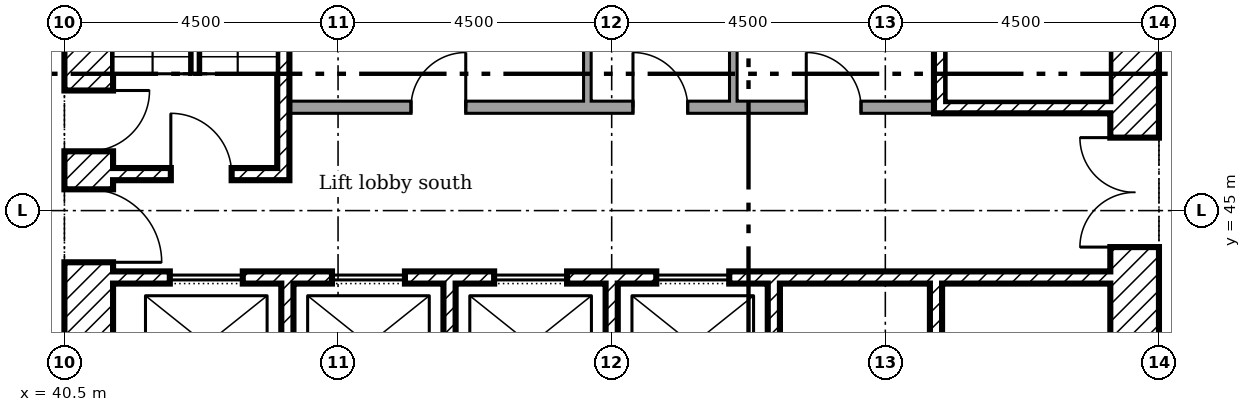
"""IFC4 building model, lengths in metres.
Left out: names, types, materials, properties, quantities, classifications, styles, units other than length and angle.
Written with IfcOpenShell. Run it as: python <this file> out.ifc"""

import sys

from ifc_helpers import new_model, si_unit, direction, frame, frame_2d, origin, place, context, subcontext, project, spatial, rectangle, extrude, element, fill, save


model = new_model("IFC4")
c1 = context("Model", 3, precision=1e-05, world=origin(), true_north=direction((0.0, 1.0)))
c2 = subcontext(c1, "Body", "Model", "MODEL_VIEW")
j1 = project(units=[si_unit("LENGTHUNIT", "METRE"), si_unit("PLANEANGLEUNIT", "RADIAN")], contexts=[c1])
p1 = place(None, origin())
s1 = spatial("IfcSite", under=j1, at=p1, CompositionType="ELEMENT")
p2 = place(p1, origin())
s2 = spatial("IfcBuilding", under=s1, at=p2, CompositionType="ELEMENT")
p3 = place(p2, frame((0.0, 0.0, 65.4)))
s3 = spatial("IfcBuildingStorey", under=s2, at=p3, CompositionType="ELEMENT", Elevation=65.4)
p4 = place(p3, frame((58.1, 40.5, 0.0), z_axis=(0.0, 0.0, 1.0), x_axis=(0.0, 1.0, 0.0)))
e1 = element("IfcWall", 1, at=p4, inside=s3, PredefinedType="SHEAR", context=c2, shape_type="SweptSolid", body=[
    extrude(rectangle(XDim=18.0, YDim=0.8, at=frame_2d((9.0, 0.0))), origin(), (0.0, 0.0, 1.0), 3.35),
])
p5 = place(p4, frame((13.15, 0.0, 0.0)))
e2 = element("IfcOpeningElement", 2, at=p5, cuts=e1, PredefinedType="OPENING", context=c2, shape_type="SweptSolid", body=[
    extrude(rectangle(XDim=1.2, YDim=2.1, at=frame_2d((0.6, 1.05))), frame((0.0, 0.41, 0.0), z_axis=(0.0, -1.0, 0.0), x_axis=(1.0, 0.0, 0.0)), (0.0, 0.0, 1.0), 0.82),
])
p6 = place(p4, frame((3.9, 0.0, 0.0)))
e3 = element("IfcOpeningElement", 3, at=p6, cuts=e1, PredefinedType="OPENING", context=c2, shape_type="SweptSolid", body=[
    extrude(rectangle(XDim=1.8, YDim=2.1, at=frame_2d((0.9, 1.05))), frame((0.0, 0.41, 0.0), z_axis=(0.0, -1.0, 0.0), x_axis=(1.0, 0.0, 0.0)), (0.0, 0.0, 1.0), 0.82),
])
p7 = place(p4, frame((11.525, 0.0, 0.0)))
e4 = element("IfcOpeningElement", 4, at=p7, cuts=e1, PredefinedType="OPENING", context=c2, shape_type="SweptSolid", body=[
    extrude(rectangle(XDim=1.0, YDim=2.1, at=frame_2d((0.5, 1.05))), frame((0.0, 0.41, 0.0), z_axis=(0.0, -1.0, 0.0), x_axis=(1.0, 0.0, 0.0)), (0.0, 0.0, 1.0), 0.82),
])
p8 = place(p3, frame((40.9, 40.5, 0.0), z_axis=(0.0, 0.0, 1.0), x_axis=(0.0, 1.0, 0.0)))
e5 = element("IfcWall", 5, at=p8, inside=s3, PredefinedType="SHEAR", context=c2, shape_type="SweptSolid", body=[
    extrude(rectangle(XDim=18.0, YDim=0.8, at=frame_2d((9.0, 0.0))), origin(), (0.0, 0.0, 1.0), 3.35),
])
p9 = place(p8, frame((3.65, 0.0, 0.0)))
e6 = element("IfcOpeningElement", 6, at=p9, cuts=e5, PredefinedType="OPENING", context=c2, shape_type="SweptSolid", body=[
    extrude(rectangle(XDim=1.2, YDim=2.1, at=frame_2d((0.6, 1.05))), frame((0.0, 0.41, 0.0), z_axis=(0.0, -1.0, 0.0), x_axis=(1.0, 0.0, 0.0)), (0.0, 0.0, 1.0), 0.82),
])
p10 = place(p8, frame((5.475, 0.0, 0.0)))
e7 = element("IfcOpeningElement", 7, at=p10, cuts=e5, PredefinedType="OPENING", context=c2, shape_type="SweptSolid", body=[
    extrude(rectangle(XDim=1.0, YDim=2.1, at=frame_2d((0.5, 1.05))), frame((0.0, 0.41, 0.0), z_axis=(0.0, -1.0, 0.0), x_axis=(1.0, 0.0, 0.0)), (0.0, 0.0, 1.0), 0.82),
])
p11 = place(p8, frame((12.3, 0.0, 0.0)))
e8 = element("IfcOpeningElement", 8, at=p11, cuts=e5, PredefinedType="OPENING", context=c2, shape_type="SweptSolid", body=[
    extrude(rectangle(XDim=1.0, YDim=2.1, at=frame_2d((0.5, 1.05))), frame((0.0, 0.41, 0.0), z_axis=(0.0, -1.0, 0.0), x_axis=(1.0, 0.0, 0.0)), (0.0, 0.0, 1.0), 0.82),
])
for number, where, z_axis, x_axis in (
    (9, (44.167, 41.3, 0.0), (0.0, 0.0, 1.0), (0.0, 1.0, 0.0)),
    (10, (46.833, 41.3, 0.0), (0.0, 0.0, 1.0), (0.0, 1.0, 0.0)),
    (11, (49.5, 41.3, 0.0), (0.0, 0.0, 1.0), (0.0, 1.0, 0.0)),
    (12, (52.167, 41.3, 0.0), (0.0, 0.0, 1.0), (0.0, 1.0, 0.0)),
    (13, (54.833, 41.3, 0.0), (0.0, 0.0, 1.0), (0.0, 1.0, 0.0)),
):
    element("IfcWall", number, at=place(p3, frame(where, z_axis=z_axis, x_axis=x_axis)), inside=s3, PredefinedType="SHEAR", context=c2, shape_type="SweptSolid", body=[
        extrude(rectangle(XDim=2.5, YDim=0.2, at=frame_2d((1.25, 0.0))), origin(), (0.0, 0.0, 1.0), 3.35),
    ])
p12 = place(p3, frame((41.3, 43.9, 0.0)))
e14 = element("IfcWall", 14, at=p12, inside=s3, PredefinedType="SHEAR", context=c2, shape_type="SweptSolid", body=[
    extrude(rectangle(XDim=16.4, YDim=0.2, at=frame_2d((8.2, 0.0))), origin(), (0.0, 0.0, 1.0), 3.35),
])
p13 = place(p12, frame((0.933, 0.0, 0.0)))
e15 = element("IfcOpeningElement", 15, at=p13, cuts=e14, PredefinedType="OPENING", context=c2, shape_type="SweptSolid", body=[
    extrude(rectangle(XDim=1.2, YDim=2.1, at=frame_2d((0.6, 1.05))), frame((0.0, 0.11, 0.0), z_axis=(0.0, -1.0, 0.0), x_axis=(1.0, 0.0, 0.0)), (0.0, 0.0, 1.0), 0.22),
])
p14 = place(p12, frame((3.6, 0.0, 0.0)))
e16 = element("IfcOpeningElement", 16, at=p14, cuts=e14, PredefinedType="OPENING", context=c2, shape_type="SweptSolid", body=[
    extrude(rectangle(XDim=1.2, YDim=2.1, at=frame_2d((0.6, 1.05))), frame((0.0, 0.11, 0.0), z_axis=(0.0, -1.0, 0.0), x_axis=(1.0, 0.0, 0.0)), (0.0, 0.0, 1.0), 0.22),
])
p15 = place(p12, frame((6.267, 0.0, 0.0)))
e17 = element("IfcOpeningElement", 17, at=p15, cuts=e14, PredefinedType="OPENING", context=c2, shape_type="SweptSolid", body=[
    extrude(rectangle(XDim=1.2, YDim=2.1, at=frame_2d((0.6, 1.05))), frame((0.0, 0.11, 0.0), z_axis=(0.0, -1.0, 0.0), x_axis=(1.0, 0.0, 0.0)), (0.0, 0.0, 1.0), 0.22),
])
p16 = place(p12, frame((8.933, 0.0, 0.0)))
e18 = element("IfcOpeningElement", 18, at=p16, cuts=e14, PredefinedType="OPENING", context=c2, shape_type="SweptSolid", body=[
    extrude(rectangle(XDim=1.2, YDim=2.1, at=frame_2d((0.6, 1.05))), frame((0.0, 0.11, 0.0), z_axis=(0.0, -1.0, 0.0), x_axis=(1.0, 0.0, 0.0)), (0.0, 0.0, 1.0), 0.22),
])
p17 = place(p3, frame((44.1, 45.5, 0.0), z_axis=(0.0, 0.0, 1.0), x_axis=(0.0, 1.0, 0.0)))
e19 = element("IfcWall", 19, at=p17, inside=s3, PredefinedType="SHEAR", context=c2, shape_type="SweptSolid", body=[
    extrude(rectangle(XDim=6.9, YDim=0.2, at=frame_2d((3.45, 0.0))), origin(), (0.0, 0.0, 1.0), 3.35),
])
p18 = place(p3, frame((41.3, 45.6, 0.0)))
e20 = element("IfcWall", 20, at=p18, inside=s3, PredefinedType="SHEAR", context=c2, shape_type="SweptSolid", body=[
    extrude(rectangle(XDim=2.7, YDim=0.2, at=frame_2d((1.35, 0.0))), origin(), (0.0, 0.0, 1.0), 3.35),
])
p19 = place(p18, frame((0.95, 0.0, 0.0)))
e21 = element("IfcOpeningElement", 21, at=p19, cuts=e20, PredefinedType="OPENING", context=c2, shape_type="SweptSolid", body=[
    extrude(rectangle(XDim=1.0, YDim=2.1, at=frame_2d((0.5, 1.05))), frame((0.0, 0.11, 0.0), z_axis=(0.0, -1.0, 0.0), x_axis=(1.0, 0.0, 0.0)), (0.0, 0.0, 1.0), 0.22),
])
p20 = place(p3, frame((54.8, 46.7, 0.0)))
e22 = element("IfcWall", 22, at=p20, inside=s3, PredefinedType="SHEAR", context=c2, shape_type="SweptSolid", body=[
    extrude(rectangle(XDim=2.9, YDim=0.2, at=frame_2d((1.45, 0.0))), origin(), (0.0, 0.0, 1.0), 3.35),
])
p21 = place(p3, frame((54.9, 46.8, 0.0), z_axis=(0.0, 0.0, 1.0), x_axis=(0.0, 1.0, 0.0)))
e23 = element("IfcWall", 23, at=p21, inside=s3, PredefinedType="SHEAR", context=c2, shape_type="SweptSolid", body=[
    extrude(rectangle(XDim=6.5, YDim=0.2, at=frame_2d((3.25, 0.0))), origin(), (0.0, 0.0, 1.0), 3.35),
])
p22 = place(p3, frame((44.2, 46.7, 0.0)))
e24 = element("IfcWall", 24, at=p22, inside=s3, PredefinedType="PARTITIONING", context=c2, shape_type="SweptSolid", body=[
    extrude(rectangle(XDim=10.6, YDim=0.2, at=frame_2d((5.3, 0.0))), origin(), (0.0, 0.0, 1.0), 3.35),
])
p23 = place(p22, frame((2.0, 0.0, 0.0)))
e25 = element("IfcOpeningElement", 25, at=p23, cuts=e24, PredefinedType="OPENING", context=c2, shape_type="SweptSolid", body=[
    extrude(rectangle(XDim=0.9, YDim=2.1, at=frame_2d((0.45, 1.05))), frame((0.0, 0.11, 0.0), z_axis=(0.0, -1.0, 0.0), x_axis=(1.0, 0.0, 0.0)), (0.0, 0.0, 1.0), 0.22),
])
p24 = place(p22, frame((5.65, 0.0, 0.0)))
e26 = element("IfcOpeningElement", 26, at=p24, cuts=e24, PredefinedType="OPENING", context=c2, shape_type="SweptSolid", body=[
    extrude(rectangle(XDim=0.9, YDim=2.1, at=frame_2d((0.45, 1.05))), frame((0.0, 0.11, 0.0), z_axis=(0.0, -1.0, 0.0), x_axis=(1.0, 0.0, 0.0)), (0.0, 0.0, 1.0), 0.22),
])
p25 = place(p22, frame((8.5, 0.0, 0.0)))
e27 = element("IfcOpeningElement", 27, at=p25, cuts=e24, PredefinedType="OPENING", context=c2, shape_type="SweptSolid", body=[
    extrude(rectangle(XDim=0.9, YDim=2.1, at=frame_2d((0.45, 1.05))), frame((0.0, 0.11, 0.0), z_axis=(0.0, -1.0, 0.0), x_axis=(1.0, 0.0, 0.0)), (0.0, 0.0, 1.0), 0.22),
])
p26 = place(p3, frame((49.1, 46.8, 0.0), z_axis=(0.0, 0.0, 1.0), x_axis=(0.0, 1.0, 0.0)))
e28 = element("IfcWall", 28, at=p26, inside=s3, PredefinedType="PARTITIONING", context=c2, shape_type="SweptSolid", body=[
    extrude(rectangle(XDim=5.0, YDim=0.125, at=frame_2d((2.5, 0.0))), origin(), (0.0, 0.0, 1.0), 3.35),
])
p27 = place(p3, frame((51.5, 46.8, 0.0), z_axis=(0.0, 0.0, 1.0), x_axis=(0.0, 1.0, 0.0)))
e29 = element("IfcWall", 29, at=p27, inside=s3, PredefinedType="PARTITIONING", context=c2, shape_type="SweptSolid", body=[
    extrude(rectangle(XDim=2.762, YDim=0.125, at=frame_2d((1.381, 0.0))), origin(), (0.0, 0.0, 1.0), 3.35),
])
p28 = place(p6, origin())
e30 = element("IfcDoor", 30, at=p28, inside=s3, OperationType="DOUBLE_DOOR_SINGLE_SWING", PredefinedType="DOOR", context=c2, shape_type="SweptSolid", body=[
    extrude(rectangle(XDim=1.8, YDim=2.1, at=frame_2d((0.9, 1.05))), frame((0.0, 0.025, 0.0), z_axis=(0.0, -1.0, 0.0), x_axis=(1.0, 0.0, 0.0)), (0.0, 0.0, 1.0), 0.05),
])
fill(e3, e30)
p29 = place(p9, frame((1.2, 0.0, 0.0), x_axis=(-1.0, 0.0, 0.0)))
e31 = element("IfcDoor", 31, at=p29, inside=s3, OperationType="SINGLE_SWING_LEFT", PredefinedType="DOOR", context=c2, shape_type="SweptSolid", body=[
    extrude(rectangle(XDim=1.2, YDim=2.1, at=frame_2d((0.6, 1.05))), frame((0.0, 0.025, 0.0), z_axis=(0.0, -1.0, 0.0), x_axis=(1.0, 0.0, 0.0)), (0.0, 0.0, 1.0), 0.05),
])
fill(e6, e31)
p30 = place(p19, origin())
e32 = element("IfcDoor", 32, at=p30, inside=s3, OperationType="SINGLE_SWING_RIGHT", PredefinedType="DOOR", context=c2, shape_type="SweptSolid", body=[
    extrude(rectangle(XDim=1.0, YDim=2.1, at=frame_2d((0.5, 1.05))), frame((0.0, 0.025, 0.0), z_axis=(0.0, -1.0, 0.0), x_axis=(1.0, 0.0, 0.0)), (0.0, 0.0, 1.0), 0.05),
])
fill(e21, e32)
p31 = place(p10, frame((1.0, 0.0, 0.0), x_axis=(-1.0, 0.0, 0.0)))
e33 = element("IfcDoor", 33, at=p31, inside=s3, OperationType="SINGLE_SWING_RIGHT", PredefinedType="DOOR", context=c2, shape_type="SweptSolid", body=[
    extrude(rectangle(XDim=1.0, YDim=2.1, at=frame_2d((0.5, 1.05))), frame((0.0, 0.025, 0.0), z_axis=(0.0, -1.0, 0.0), x_axis=(1.0, 0.0, 0.0)), (0.0, 0.0, 1.0), 0.05),
])
fill(e7, e33)
p32 = place(p23, origin())
e34 = element("IfcDoor", 34, at=p32, inside=s3, OperationType="SINGLE_SWING_LEFT", PredefinedType="DOOR", context=c2, shape_type="SweptSolid", body=[
    extrude(rectangle(XDim=0.9, YDim=2.1, at=frame_2d((0.45, 1.05))), frame((0.0, 0.025, 0.0), z_axis=(0.0, -1.0, 0.0), x_axis=(1.0, 0.0, 0.0)), (0.0, 0.0, 1.0), 0.05),
])
fill(e25, e34)
p33 = place(p24, origin())
e35 = element("IfcDoor", 35, at=p33, inside=s3, OperationType="SINGLE_SWING_RIGHT", PredefinedType="DOOR", context=c2, shape_type="SweptSolid", body=[
    extrude(rectangle(XDim=0.9, YDim=2.1, at=frame_2d((0.45, 1.05))), frame((0.0, 0.025, 0.0), z_axis=(0.0, -1.0, 0.0), x_axis=(1.0, 0.0, 0.0)), (0.0, 0.0, 1.0), 0.05),
])
fill(e26, e35)
p34 = place(p25, origin())
e36 = element("IfcDoor", 36, at=p34, inside=s3, OperationType="SINGLE_SWING_RIGHT", PredefinedType="DOOR", context=c2, shape_type="SweptSolid", body=[
    extrude(rectangle(XDim=0.9, YDim=2.1, at=frame_2d((0.45, 1.05))), frame((0.0, 0.025, 0.0), z_axis=(0.0, -1.0, 0.0), x_axis=(1.0, 0.0, 0.0)), (0.0, 0.0, 1.0), 0.05),
])
fill(e27, e36)
p35 = place(p13, origin())
e37 = element("IfcDoor", 37, at=p35, inside=s3, OperationType="SLIDING_TO_LEFT", PredefinedType="DOOR", context=c2, shape_type="SweptSolid", body=[
    extrude(rectangle(XDim=1.2, YDim=2.1, at=frame_2d((0.6, 1.05))), frame((0.0, 0.025, 0.0), z_axis=(0.0, -1.0, 0.0), x_axis=(1.0, 0.0, 0.0)), (0.0, 0.0, 1.0), 0.05),
])
fill(e15, e37)
p36 = place(p14, origin())
e38 = element("IfcDoor", 38, at=p36, inside=s3, OperationType="SLIDING_TO_LEFT", PredefinedType="DOOR", context=c2, shape_type="SweptSolid", body=[
    extrude(rectangle(XDim=1.2, YDim=2.1, at=frame_2d((0.6, 1.05))), frame((0.0, 0.025, 0.0), z_axis=(0.0, -1.0, 0.0), x_axis=(1.0, 0.0, 0.0)), (0.0, 0.0, 1.0), 0.05),
])
fill(e16, e38)
p37 = place(p15, origin())
e39 = element("IfcDoor", 39, at=p37, inside=s3, OperationType="SLIDING_TO_LEFT", PredefinedType="DOOR", context=c2, shape_type="SweptSolid", body=[
    extrude(rectangle(XDim=1.2, YDim=2.1, at=frame_2d((0.6, 1.05))), frame((0.0, 0.025, 0.0), z_axis=(0.0, -1.0, 0.0), x_axis=(1.0, 0.0, 0.0)), (0.0, 0.0, 1.0), 0.05),
])
fill(e17, e39)
p38 = place(p16, origin())
e40 = element("IfcDoor", 40, at=p38, inside=s3, OperationType="SLIDING_TO_LEFT", PredefinedType="DOOR", context=c2, shape_type="SweptSolid", body=[
    extrude(rectangle(XDim=1.2, YDim=2.1, at=frame_2d((0.6, 1.05))), frame((0.0, 0.025, 0.0), z_axis=(0.0, -1.0, 0.0), x_axis=(1.0, 0.0, 0.0)), (0.0, 0.0, 1.0), 0.05),
])
fill(e18, e40)
save(model, sys.argv[1])
